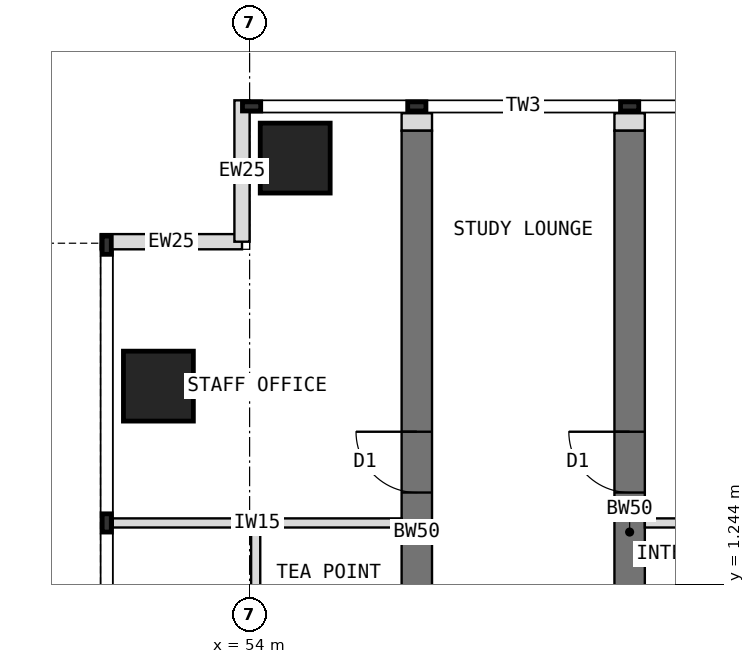
"""IFC4 building model, lengths in metres.
Left out: names, types, materials, properties, quantities, classifications, styles, units other than length and angle.
Written with IfcOpenShell. Run it as: python <this file> out.ifc"""

import sys

from ifc_helpers import new_model, si_unit, direction, frame, frame_2d, origin, origin_2d, place, context, subcontext, project, spatial, rectangle, extrude, element, fill, save


model = new_model("IFC4")
c1 = context("Model", 3, precision=1e-05, world=origin(), true_north=direction((0.0, 1.0)))
c2 = subcontext(c1, "Body", "Model", "MODEL_VIEW")
j1 = project(units=[si_unit("LENGTHUNIT", "METRE"), si_unit("PLANEANGLEUNIT", "RADIAN")], contexts=[c1])
p1 = place(None, origin())
s1 = spatial("IfcSite", under=j1, at=p1, CompositionType="ELEMENT")
p2 = place(p1, origin())
s2 = spatial("IfcBuilding", under=s1, at=p2, CompositionType="ELEMENT")
p3 = place(p2, frame((0.0, 0.0, 194.5)))
s3 = spatial("IfcBuildingStorey", under=s2, at=p3, CompositionType="ELEMENT", Elevation=194.5)
p4 = place(p3, frame((56.75, -4.5, 0.0), z_axis=(0.0, 0.0, 1.0), x_axis=(0.0, 1.0, 0.0)))
e1 = element("IfcWall", 1, at=p4, inside=s3, PredefinedType="SHEAR", context=c2, shape_type="SweptSolid", body=[
    extrude(rectangle(XDim=13.2, YDim=0.5, at=frame_2d((6.6, 0.0))), origin(), (0.0, 0.0, 1.0), 4.0),
])
p5 = place(p4, frame((0.55, 0.0, 0.0)))
e2 = element("IfcOpeningElement", 2, at=p5, cuts=e1, PredefinedType="OPENING", context=c2, shape_type="SweptSolid", body=[
    extrude(rectangle(XDim=0.9, YDim=2.1, at=frame_2d((0.45, 1.05))), frame((0.0, 0.26, 0.0), z_axis=(0.0, -1.0, 0.0), x_axis=(1.0, 0.0, 0.0)), (0.0, 0.0, 1.0), 0.52),
])
p6 = place(p4, frame((2.75, 0.0, 0.0)))
e3 = element("IfcOpeningElement", 3, at=p6, cuts=e1, PredefinedType="OPENING", context=c2, shape_type="SweptSolid", body=[
    extrude(rectangle(XDim=1.0, YDim=2.1, at=frame_2d((0.5, 1.05))), frame((0.0, 0.26, 0.0), z_axis=(0.0, -1.0, 0.0), x_axis=(1.0, 0.0, 0.0)), (0.0, 0.0, 1.0), 0.52),
])
p7 = place(p4, frame((7.25, 0.0, 0.0)))
e4 = element("IfcOpeningElement", 4, at=p7, cuts=e1, PredefinedType="OPENING", context=c2, shape_type="SweptSolid", body=[
    extrude(rectangle(XDim=1.0, YDim=2.1, at=frame_2d((0.5, 1.05))), frame((0.0, 0.26, 0.0), z_axis=(0.0, -1.0, 0.0), x_axis=(1.0, 0.0, 0.0)), (0.0, 0.0, 1.0), 0.52),
])
p8 = place(p3, frame((60.25, -4.5, 0.0), z_axis=(0.0, 0.0, 1.0), x_axis=(0.0, 1.0, 0.0)))
e5 = element("IfcWall", 5, at=p8, inside=s3, PredefinedType="SHEAR", context=c2, shape_type="SweptSolid", body=[
    extrude(rectangle(XDim=13.2, YDim=0.5, at=frame_2d((6.6, 0.0))), origin(), (0.0, 0.0, 1.0), 4.0),
])
p9 = place(p8, frame((0.55, 0.0, 0.0)))
e6 = element("IfcOpeningElement", 6, at=p9, cuts=e5, PredefinedType="OPENING", context=c2, shape_type="SweptSolid", body=[
    extrude(rectangle(XDim=0.9, YDim=2.1, at=frame_2d((0.45, 1.05))), frame((0.0, 0.26, 0.0), z_axis=(0.0, -1.0, 0.0), x_axis=(1.0, 0.0, 0.0)), (0.0, 0.0, 1.0), 0.52),
])
p10 = place(p8, frame((2.75, 0.0, 0.0)))
e7 = element("IfcOpeningElement", 7, at=p10, cuts=e5, PredefinedType="OPENING", context=c2, shape_type="SweptSolid", body=[
    extrude(rectangle(XDim=1.0, YDim=2.1, at=frame_2d((0.5, 1.05))), frame((0.0, 0.26, 0.0), z_axis=(0.0, -1.0, 0.0), x_axis=(1.0, 0.0, 0.0)), (0.0, 0.0, 1.0), 0.52),
])
p11 = place(p8, frame((7.25, 0.0, 0.0)))
e8 = element("IfcOpeningElement", 8, at=p11, cuts=e5, PredefinedType="OPENING", context=c2, shape_type="SweptSolid", body=[
    extrude(rectangle(XDim=1.0, YDim=2.1, at=frame_2d((0.5, 1.05))), frame((0.0, 0.26, 0.0), z_axis=(0.0, -1.0, 0.0), x_axis=(1.0, 0.0, 0.0)), (0.0, 0.0, 1.0), 0.52),
])
for number, where, z_axis, x_axis in (
    (9, (52.5, 4.5, 0.0), (0.0, 0.0, 1.0), (1.0, 0.0, 0.0)),
    (10, (54.75, 8.25, 0.0), (0.0, 0.0, 1.0), (1.0, 0.0, 0.0)),
):
    element("IfcColumn", number, at=place(p3, frame(where, z_axis=z_axis, x_axis=x_axis)), inside=s3, PredefinedType="COLUMN", context=c2, shape_type="SweptSolid", body=[
        extrude(rectangle(XDim=1.15, YDim=1.15, at=origin_2d()), origin(), (0.0, 0.0, 1.0), 4.0),
    ])
for number, where, z_axis, x_axis in (
    (11, (51.55, 6.875, 0.0), (0.0, 0.0, 1.0), (1.0, 0.0, 0.0)),
    (12, (53.875, 6.875, 0.0), (0.0, 0.0, 1.0), (0.0, 1.0, 0.0)),
):
    element("IfcWall", number, at=place(p3, frame(where, z_axis=z_axis, x_axis=x_axis)), inside=s3, PredefinedType="STANDARD", context=c2, shape_type="SweptSolid", body=[
        extrude(rectangle(XDim=2.325, YDim=0.25, at=frame_2d((1.163, 0.0))), origin(), (0.0, 0.0, 1.0), 3.8),
    ])
for number, where, z_axis, x_axis in (
    (13, (56.75, 8.7, 0.0), (0.0, 0.0, 1.0), (0.0, 1.0, 0.0)),
    (14, (60.25, 8.7, 0.0), (0.0, 0.0, 1.0), (0.0, 1.0, 0.0)),
):
    element("IfcWall", number, at=place(p3, frame(where, z_axis=z_axis, x_axis=x_axis)), inside=s3, PredefinedType="PARTITIONING", context=c2, shape_type="SweptSolid", body=[
        extrude(rectangle(XDim=0.288, YDim=0.5, at=frame_2d((0.144, 0.0))), origin(), (0.0, 0.0, 1.0), 3.8),
    ])
p12 = place(p3, frame((56.5, 2.25, 0.0), z_axis=(0.0, 0.0, 1.0), x_axis=(-1.0, 0.0, 0.0)))
e15 = element("IfcWall", 15, at=p12, inside=s3, PredefinedType="PARTITIONING", context=c2, shape_type="SweptSolid", body=[
    extrude(rectangle(XDim=4.75, YDim=0.15, at=frame_2d((2.375, 0.0))), origin(), (0.0, 0.0, 1.0), 3.8),
])
p13 = place(p3, frame((54.1, -0.15, 0.0), z_axis=(0.0, 0.0, 1.0), x_axis=(0.0, 1.0, 0.0)))
e16 = element("IfcWall", 16, at=p13, inside=s3, PredefinedType="PARTITIONING", context=c2, shape_type="SweptSolid", body=[
    extrude(rectangle(XDim=2.4, YDim=0.15, at=frame_2d((1.2, 0.0))), origin(), (0.0, 0.0, 1.0), 3.8),
])
p14 = place(p3, frame((60.5, 2.25, 0.0), z_axis=(0.0, 0.0, 1.0), x_axis=(1.0, 0.0, 0.0)))
e17 = element("IfcWall", 17, at=p14, inside=s3, PredefinedType="PARTITIONING", context=c2, shape_type="SweptSolid", body=[
    extrude(rectangle(XDim=4.75, YDim=0.15, at=frame_2d((2.375, 0.0))), origin(), (0.0, 0.0, 1.0), 3.8),
])
p15 = place(p7, origin())
e18 = element("IfcDoor", 18, at=p15, inside=s3, OperationType="SINGLE_SWING_RIGHT", PredefinedType="DOOR", context=c2, shape_type="SweptSolid", body=[
    extrude(rectangle(XDim=1.0, YDim=2.1, at=frame_2d((0.5, 1.05))), frame((0.0, 0.025, 0.0), z_axis=(0.0, -1.0, 0.0), x_axis=(1.0, 0.0, 0.0)), (0.0, 0.0, 1.0), 0.05),
])
fill(e4, e18)
p16 = place(p11, origin())
e19 = element("IfcDoor", 19, at=p16, inside=s3, OperationType="SINGLE_SWING_RIGHT", PredefinedType="DOOR", context=c2, shape_type="SweptSolid", body=[
    extrude(rectangle(XDim=1.0, YDim=2.1, at=frame_2d((0.5, 1.05))), frame((0.0, 0.025, 0.0), z_axis=(0.0, -1.0, 0.0), x_axis=(1.0, 0.0, 0.0)), (0.0, 0.0, 1.0), 0.05),
])
fill(e8, e19)
save(model, sys.argv[1])
